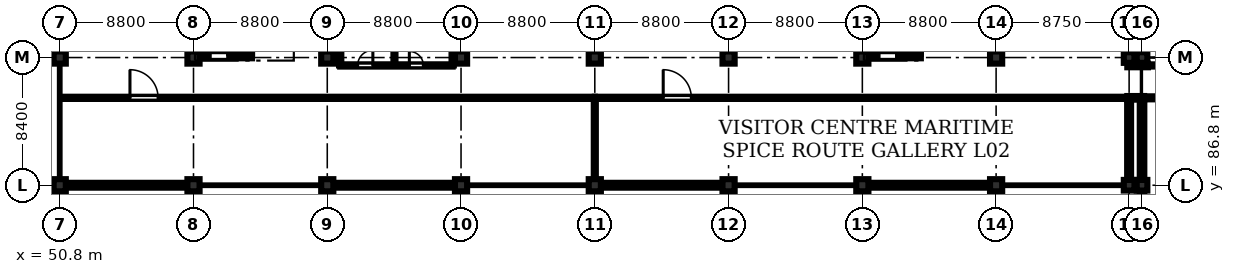
"""IFC4 building model, lengths in metres.
Left out: names, types, materials, properties, quantities, classifications, styles, units other than length and angle.
Written with IfcOpenShell. Run it as: python <this file> out.ifc"""

import sys

from ifc_helpers import new_model, si_unit, direction, frame, frame_2d, origin, origin_2d, place, context, subcontext, project, spatial, rectangle, extrude, element, fill, save


model = new_model("IFC4")
c1 = context("Model", 3, precision=1e-05, world=origin(), true_north=direction((0.0, 1.0)))
c2 = subcontext(c1, "Body", "Model", "MODEL_VIEW")
j1 = project(units=[si_unit("LENGTHUNIT", "METRE"), si_unit("PLANEANGLEUNIT", "RADIAN")], contexts=[c1])
p1 = place(None, origin())
s1 = spatial("IfcSite", under=j1, at=p1, CompositionType="ELEMENT")
p2 = place(p1, origin())
s2 = spatial("IfcBuilding", under=s1, at=p2, CompositionType="ELEMENT")
p3 = place(p2, frame((0.0, 0.0, 5.4)))
s3 = spatial("IfcBuildingStorey", under=s2, at=p3, CompositionType="ELEMENT", Elevation=5.4)
for number, where, z_axis, x_axis in (
    (1, (50.8, 86.8, 0.0), (0.0, 0.0, 1.0), (1.0, 0.0, 0.0)),
    (2, (50.8, 95.2, 0.0), (0.0, 0.0, 1.0), (1.0, 0.0, 0.0)),
    (3, (59.6, 86.8, 0.0), (0.0, 0.0, 1.0), (1.0, 0.0, 0.0)),
    (4, (59.6, 95.2, 0.0), (0.0, 0.0, 1.0), (1.0, 0.0, 0.0)),
    (5, (68.4, 86.8, 0.0), (0.0, 0.0, 1.0), (1.0, 0.0, 0.0)),
    (6, (68.4, 95.2, 0.0), (0.0, 0.0, 1.0), (1.0, 0.0, 0.0)),
    (7, (77.2, 86.8, 0.0), (0.0, 0.0, 1.0), (1.0, 0.0, 0.0)),
    (8, (77.2, 95.2, 0.0), (0.0, 0.0, 1.0), (1.0, 0.0, 0.0)),
    (9, (86.0, 86.8, 0.0), (0.0, 0.0, 1.0), (1.0, 0.0, 0.0)),
    (10, (86.0, 95.2, 0.0), (0.0, 0.0, 1.0), (1.0, 0.0, 0.0)),
    (11, (94.8, 86.8, 0.0), (0.0, 0.0, 1.0), (1.0, 0.0, 0.0)),
    (12, (94.8, 95.2, 0.0), (0.0, 0.0, 1.0), (1.0, 0.0, 0.0)),
    (13, (103.6, 86.8, 0.0), (0.0, 0.0, 1.0), (1.0, 0.0, 0.0)),
    (14, (103.6, 95.2, 0.0), (0.0, 0.0, 1.0), (1.0, 0.0, 0.0)),
    (15, (112.4, 86.8, 0.0), (0.0, 0.0, 1.0), (1.0, 0.0, 0.0)),
    (16, (112.4, 95.2, 0.0), (0.0, 0.0, 1.0), (1.0, 0.0, 0.0)),
):
    element("IfcColumn", number, at=place(p3, frame(where, z_axis=z_axis, x_axis=x_axis)), inside=s3, PredefinedType="COLUMN", context=c2, shape_type="SweptSolid", body=[
        extrude(rectangle(XDim=0.8, YDim=0.8, at=origin_2d()), origin(), (0.0, 0.0, 1.0), 4.58),
    ])
for number, where, z_axis, x_axis in (
    (17, (121.15, 86.8, 0.0), (0.0, 0.0, 1.0), (1.0, 0.0, 0.0)),
    (18, (121.15, 95.2, 0.0), (0.0, 0.0, 1.0), (1.0, 0.0, 0.0)),
    (19, (122.0, 86.8, 0.0), (0.0, 0.0, 1.0), (1.0, 0.0, 0.0)),
    (20, (122.0, 95.2, 0.0), (0.0, 0.0, 1.0), (1.0, 0.0, 0.0)),
):
    element("IfcColumn", number, at=place(p3, frame(where, z_axis=z_axis, x_axis=x_axis)), inside=s3, PredefinedType="COLUMN", context=c2, shape_type="SweptSolid", body=[
        extrude(rectangle(XDim=0.7, YDim=0.7, at=origin_2d()), origin(), (0.0, 0.0, 1.0), 4.58),
    ])
p4 = place(p3, frame((59.75, 95.3, 0.0), z_axis=(0.0, 0.0, 1.0), x_axis=(1.0, 0.0, 0.0)))
e21 = element("IfcWall", 21, at=p4, inside=s3, PredefinedType="SHEAR", context=c2, shape_type="SweptSolid", body=[
    extrude(rectangle(XDim=3.7, YDim=0.3, at=frame_2d((1.85, 0.0))), origin(), (0.0, 0.0, 1.0), 4.58),
])
p5 = place(p4, frame((0.95, 0.0, 0.0)))
e22 = element("IfcOpeningElement", 22, at=p5, cuts=e21, PredefinedType="OPENING", context=c2, shape_type="SweptSolid", body=[
    extrude(rectangle(XDim=1.15, YDim=2.15, at=frame_2d((0.575, 1.075))), frame((0.0, 0.16, 0.0), z_axis=(0.0, -1.0, 0.0), x_axis=(1.0, 0.0, 0.0)), (0.0, 0.0, 1.0), 0.32),
])
for number, where, z_axis, x_axis in (
    (23, (59.9, 95.45, 0.0), (0.0, 0.0, 1.0), (0.0, 1.0, 0.0)),
    (24, (63.3, 95.45, 0.0), (0.0, 0.0, 1.0), (0.0, 1.0, 0.0)),
):
    element("IfcWall", number, at=place(p3, frame(where, z_axis=z_axis, x_axis=x_axis)), inside=s3, PredefinedType="SHEAR", context=c2, shape_type="SweptSolid", body=[
        extrude(rectangle(XDim=7.9, YDim=0.3, at=frame_2d((3.95, 0.0))), origin(), (0.0, 0.0, 1.0), 4.58),
    ])
p6 = place(p3, frame((103.75, 95.3, 0.0), z_axis=(0.0, 0.0, 1.0), x_axis=(1.0, 0.0, 0.0)))
e25 = element("IfcWall", 25, at=p6, inside=s3, PredefinedType="SHEAR", context=c2, shape_type="SweptSolid", body=[
    extrude(rectangle(XDim=3.7, YDim=0.3, at=frame_2d((1.85, 0.0))), origin(), (0.0, 0.0, 1.0), 4.58),
])
p7 = place(p6, frame((0.95, 0.0, 0.0)))
e26 = element("IfcOpeningElement", 26, at=p7, cuts=e25, PredefinedType="OPENING", context=c2, shape_type="SweptSolid", body=[
    extrude(rectangle(XDim=1.15, YDim=2.15, at=frame_2d((0.575, 1.075))), frame((0.0, 0.16, 0.0), z_axis=(0.0, -1.0, 0.0), x_axis=(1.0, 0.0, 0.0)), (0.0, 0.0, 1.0), 0.32),
])
for number, where, z_axis, x_axis in (
    (27, (103.9, 95.45, 0.0), (0.0, 0.0, 1.0), (0.0, 1.0, 0.0)),
    (28, (107.3, 95.45, 0.0), (0.0, 0.0, 1.0), (0.0, 1.0, 0.0)),
):
    element("IfcWall", number, at=place(p3, frame(where, z_axis=z_axis, x_axis=x_axis)), inside=s3, PredefinedType="SHEAR", context=c2, shape_type="SweptSolid", body=[
        extrude(rectangle(XDim=7.9, YDim=0.3, at=frame_2d((3.95, 0.0))), origin(), (0.0, 0.0, 1.0), 4.58),
    ])
p8 = place(p3, frame((59.2, 86.8, 0.0), z_axis=(0.0, 0.0, 1.0), x_axis=(-1.0, 0.0, 0.0)))
e29 = element("IfcWall", 29, at=p8, inside=s3, PredefinedType="STANDARD", context=c2, shape_type="SweptSolid", body=[
    extrude(rectangle(XDim=8.0, YDim=0.32, at=frame_2d((4.0, 0.0))), origin(), (0.0, 0.0, 1.0), 3.93),
])
p9 = place(p8, frame((2.8, 0.0, 0.95)))
e30 = element("IfcOpeningElement", 30, at=p9, cuts=e29, PredefinedType="OPENING", context=c2, shape_type="SweptSolid", body=[
    extrude(rectangle(XDim=2.0, YDim=2.2, at=frame_2d((1.0, 1.1))), frame((0.0, 0.17, 0.0), z_axis=(0.0, -1.0, 0.0), x_axis=(1.0, 0.0, 0.0)), (0.0, 0.0, 1.0), 0.34),
])
p10 = place(p3, frame((76.8, 86.8, 0.0), z_axis=(0.0, 0.0, 1.0), x_axis=(-1.0, 0.0, 0.0)))
e31 = element("IfcWall", 31, at=p10, inside=s3, PredefinedType="STANDARD", context=c2, shape_type="SweptSolid", body=[
    extrude(rectangle(XDim=8.0, YDim=0.32, at=frame_2d((4.0, 0.0))), origin(), (0.0, 0.0, 1.0), 3.93),
])
p11 = place(p10, frame((2.8, 0.0, 0.95)))
e32 = element("IfcOpeningElement", 32, at=p11, cuts=e31, PredefinedType="OPENING", context=c2, shape_type="SweptSolid", body=[
    extrude(rectangle(XDim=2.0, YDim=2.2, at=frame_2d((1.0, 1.1))), frame((0.0, 0.17, 0.0), z_axis=(0.0, -1.0, 0.0), x_axis=(1.0, 0.0, 0.0)), (0.0, 0.0, 1.0), 0.34),
])
p12 = place(p3, frame((94.4, 86.8, 0.0), z_axis=(0.0, 0.0, 1.0), x_axis=(-1.0, 0.0, 0.0)))
e33 = element("IfcWall", 33, at=p12, inside=s3, PredefinedType="STANDARD", context=c2, shape_type="SweptSolid", body=[
    extrude(rectangle(XDim=8.0, YDim=0.32, at=frame_2d((4.0, 0.0))), origin(), (0.0, 0.0, 1.0), 3.93),
])
p13 = place(p12, frame((2.8, 0.0, 0.95)))
e34 = element("IfcOpeningElement", 34, at=p13, cuts=e33, PredefinedType="OPENING", context=c2, shape_type="SweptSolid", body=[
    extrude(rectangle(XDim=2.0, YDim=2.2, at=frame_2d((1.0, 1.1))), frame((0.0, 0.17, 0.0), z_axis=(0.0, -1.0, 0.0), x_axis=(1.0, 0.0, 0.0)), (0.0, 0.0, 1.0), 0.34),
])
p14 = place(p3, frame((112.0, 86.8, 0.0), z_axis=(0.0, 0.0, 1.0), x_axis=(-1.0, 0.0, 0.0)))
e35 = element("IfcWall", 35, at=p14, inside=s3, PredefinedType="STANDARD", context=c2, shape_type="SweptSolid", body=[
    extrude(rectangle(XDim=8.0, YDim=0.32, at=frame_2d((4.0, 0.0))), origin(), (0.0, 0.0, 1.0), 3.93),
])
p15 = place(p14, frame((2.8, 0.0, 0.95)))
e36 = element("IfcOpeningElement", 36, at=p15, cuts=e35, PredefinedType="OPENING", context=c2, shape_type="SweptSolid", body=[
    extrude(rectangle(XDim=2.0, YDim=2.2, at=frame_2d((1.0, 1.1))), frame((0.0, 0.17, 0.0), z_axis=(0.0, -1.0, 0.0), x_axis=(1.0, 0.0, 0.0)), (0.0, 0.0, 1.0), 0.34),
])
p16 = place(p3, frame((121.15, 92.42, 0.0), z_axis=(0.0, 0.0, 1.0), x_axis=(0.0, -1.0, 0.0)))
e37 = element("IfcWall", 37, at=p16, inside=s3, PredefinedType="STANDARD", context=c2, shape_type="SweptSolid", body=[
    extrude(rectangle(XDim=5.27, YDim=0.26, at=frame_2d((2.635, 0.0))), origin(), (0.0, 0.0, 1.0), 3.93),
])
p17 = place(p3, frame((121.15, 103.25, 0.0), z_axis=(0.0, 0.0, 1.0), x_axis=(0.0, -1.0, 0.0)))
e38 = element("IfcWall", 38, at=p17, inside=s3, PredefinedType="STANDARD", context=c2, shape_type="SweptSolid", body=[
    extrude(rectangle(XDim=7.7, YDim=0.26, at=frame_2d((3.85, 0.0))), origin(), (0.0, 0.0, 1.0), 3.93),
])
p18 = place(p3, frame((122.0, 78.75, 0.0), z_axis=(0.0, 0.0, 1.0), x_axis=(0.0, 1.0, 0.0)))
e39 = element("IfcWall", 39, at=p18, inside=s3, PredefinedType="STANDARD", context=c2, shape_type="SweptSolid", body=[
    extrude(rectangle(XDim=7.7, YDim=0.3, at=frame_2d((3.85, 0.0))), origin(), (0.0, 0.0, 1.0), 3.83),
])
p19 = place(p3, frame((122.0, 87.15, 0.0), z_axis=(0.0, 0.0, 1.0), x_axis=(0.0, 1.0, 0.0)))
e40 = element("IfcWall", 40, at=p19, inside=s3, PredefinedType="STANDARD", context=c2, shape_type="SweptSolid", body=[
    extrude(rectangle(XDim=5.27, YDim=0.3, at=frame_2d((2.635, 0.0))), origin(), (0.0, 0.0, 1.0), 3.83),
])
p20 = place(p3, frame((122.14, 92.55, 0.0), z_axis=(0.0, 0.0, 1.0), x_axis=(-1.0, 0.0, 0.0)))
e41 = element("IfcWall", 41, at=p20, inside=s3, PredefinedType="STANDARD", context=c2, shape_type="SweptSolid", body=[
    extrude(rectangle(XDim=1.11, YDim=0.24, at=frame_2d((0.555, 0.0))), origin(), (0.0, 0.0, 1.0), 4.58),
])
p21 = place(p3, frame((121.03, 94.68, 0.0), z_axis=(0.0, 0.0, 1.0), x_axis=(1.0, 0.0, 0.0)))
e42 = element("IfcWall", 42, at=p21, inside=s3, PredefinedType="STANDARD", context=c2, shape_type="SweptSolid", body=[
    extrude(rectangle(XDim=1.36, YDim=0.24, at=frame_2d((0.68, 0.0))), origin(), (0.0, 0.0, 1.0), 4.58),
])
p22 = place(p3, frame((122.0, 95.55, 0.0), z_axis=(0.0, 0.0, 1.0), x_axis=(0.0, 1.0, 0.0)))
e43 = element("IfcWall", 43, at=p22, inside=s3, PredefinedType="STANDARD", context=c2, shape_type="SweptSolid", body=[
    extrude(rectangle(XDim=7.7, YDim=0.3, at=frame_2d((3.85, 0.0))), origin(), (0.0, 0.0, 1.0), 3.83),
])
p23 = place(p3, frame((69.25, 94.68, 0.0), z_axis=(0.0, 0.0, 1.0), x_axis=(1.0, 0.0, 0.0)))
e44 = element("IfcWall", 44, at=p23, inside=s3, PredefinedType="PARTITIONING", context=c2, shape_type="SweptSolid", body=[
    extrude(rectangle(XDim=7.4, YDim=0.15, at=frame_2d((3.7, 0.0))), origin(), (0.0, 0.0, 1.0), 4.58),
])
p24 = place(p23, frame((1.15, 0.0, 0.0)))
e45 = element("IfcOpeningElement", 45, at=p24, cuts=e44, PredefinedType="OPENING", context=c2, shape_type="SweptSolid", body=[
    extrude(rectangle(XDim=1.0, YDim=2.12, at=frame_2d((0.5, 1.06))), frame((0.0, 0.085, 0.0), z_axis=(0.0, -1.0, 0.0), x_axis=(1.0, 0.0, 0.0)), (0.0, 0.0, 1.0), 0.17),
])
p25 = place(p23, frame((4.55, 0.0, 0.0)))
e46 = element("IfcOpeningElement", 46, at=p25, cuts=e44, PredefinedType="OPENING", context=c2, shape_type="SweptSolid", body=[
    extrude(rectangle(XDim=0.92, YDim=2.1, at=frame_2d((0.46, 1.05))), frame((0.0, 0.085, 0.0), z_axis=(0.0, -1.0, 0.0), x_axis=(1.0, 0.0, 0.0)), (0.0, 0.0, 1.0), 0.17),
])
p26 = place(p3, frame((69.25, 94.68, 0.0), z_axis=(0.0, 0.0, 1.0), x_axis=(0.0, 1.0, 0.0)))
e47 = element("IfcWall", 47, at=p26, inside=s3, PredefinedType="PARTITIONING", context=c2, shape_type="SweptSolid", body=[
    extrude(rectangle(XDim=8.57, YDim=0.15, at=frame_2d((4.285, 0.0))), origin(), (0.0, 0.0, 1.0), 4.58),
])
p27 = place(p3, frame((72.82, 94.68, 0.0), z_axis=(0.0, 0.0, 1.0), x_axis=(0.0, 1.0, 0.0)))
e48 = element("IfcWall", 48, at=p27, inside=s3, PredefinedType="PARTITIONING", context=c2, shape_type="SweptSolid", body=[
    extrude(rectangle(XDim=8.57, YDim=0.135, at=frame_2d((4.285, 0.0))), origin(), (0.0, 0.0, 1.0), 4.24),
])
p28 = place(p3, frame((76.65, 94.68, 0.0), z_axis=(0.0, 0.0, 1.0), x_axis=(0.0, 1.0, 0.0)))
e49 = element("IfcWall", 49, at=p28, inside=s3, PredefinedType="PARTITIONING", context=c2, shape_type="SweptSolid", body=[
    extrude(rectangle(XDim=8.57, YDim=0.15, at=frame_2d((4.285, 0.0))), origin(), (0.0, 0.0, 1.0), 4.58),
])
p29 = place(p3, frame((50.92, 92.55, 0.0), z_axis=(0.0, 0.0, 1.0), x_axis=(1.0, 0.0, 0.0)))
e50 = element("IfcWall", 50, at=p29, inside=s3, PredefinedType="PARTITIONING", context=c2, shape_type="SweptSolid", body=[
    extrude(rectangle(XDim=35.08, YDim=0.145, at=frame_2d((17.54, 0.0))), origin(), (0.0, 0.0, 1.0), 4.58),
])
p30 = place(p29, frame((4.5, 0.0, 0.0)))
e51 = element("IfcOpeningElement", 51, at=p30, cuts=e50, PredefinedType="OPENING", context=c2, shape_type="SweptSolid", body=[
    extrude(rectangle(XDim=1.85, YDim=2.25, at=frame_2d((0.925, 1.125))), frame((0.0, 0.083, 0.0), z_axis=(0.0, -1.0, 0.0), x_axis=(1.0, 0.0, 0.0)), (0.0, 0.0, 1.0), 0.165),
])
p31 = place(p3, frame((86.0, 92.55, 0.0), z_axis=(0.0, 0.0, 1.0), x_axis=(1.0, 0.0, 0.0)))
e52 = element("IfcWall", 52, at=p31, inside=s3, PredefinedType="PARTITIONING", context=c2, shape_type="SweptSolid", body=[
    extrude(rectangle(XDim=35.02, YDim=0.145, at=frame_2d((17.51, 0.0))), origin(), (0.0, 0.0, 1.0), 4.58),
])
p32 = place(p31, frame((4.5, 0.0, 0.0)))
e53 = element("IfcOpeningElement", 53, at=p32, cuts=e52, PredefinedType="OPENING", context=c2, shape_type="SweptSolid", body=[
    extrude(rectangle(XDim=1.85, YDim=2.25, at=frame_2d((0.925, 1.125))), frame((0.0, 0.083, 0.0), z_axis=(0.0, -1.0, 0.0), x_axis=(1.0, 0.0, 0.0)), (0.0, 0.0, 1.0), 0.165),
])
p33 = place(p3, frame((86.0, 86.95, 0.0), z_axis=(0.0, 0.0, 1.0), x_axis=(0.0, 1.0, 0.0)))
e54 = element("IfcWall", 54, at=p33, inside=s3, PredefinedType="PARTITIONING", context=c2, shape_type="SweptSolid", body=[
    extrude(rectangle(XDim=5.6, YDim=0.135, at=frame_2d((2.8, 0.0))), origin(), (0.0, 0.0, 1.0), 3.93),
])
p34 = place(p3, frame((122.4, 94.68, 0.0), z_axis=(0.0, 0.0, 1.0), x_axis=(1.0, 0.0, 0.0)))
e55 = element("IfcWall", 55, at=p34, inside=s3, PredefinedType="PARTITIONING", context=c2, shape_type="SweptSolid", body=[
    extrude(rectangle(XDim=13.8, YDim=0.145, at=frame_2d((6.9, 0.0))), origin(), (0.0, 0.0, 1.0), 4.58),
])
p35 = place(p34, frame((3.2, 0.0, 0.0)))
e56 = element("IfcOpeningElement", 56, at=p35, cuts=e55, PredefinedType="OPENING", context=c2, shape_type="SweptSolid", body=[
    extrude(rectangle(XDim=1.02, YDim=2.15, at=frame_2d((0.51, 1.075))), frame((0.0, 0.083, 0.0), z_axis=(0.0, -1.0, 0.0), x_axis=(1.0, 0.0, 0.0)), (0.0, 0.0, 1.0), 0.165),
])
p36 = place(p3, frame((122.15, 92.55, 0.0), z_axis=(0.0, 0.0, 1.0), x_axis=(1.0, 0.0, 0.0)))
e57 = element("IfcWall", 57, at=p36, inside=s3, PredefinedType="SOLIDWALL", context=c2, shape_type="SweptSolid", body=[
    extrude(rectangle(XDim=12.45, YDim=0.2, at=frame_2d((6.225, 0.0))), origin(), (0.0, 0.0, 1.0), 4.58),
])
p37 = place(p36, frame((3.75, 0.0, 0.0)))
e58 = element("IfcOpeningElement", 58, at=p37, cuts=e57, PredefinedType="OPENING", context=c2, shape_type="SweptSolid", body=[
    extrude(rectangle(XDim=1.5, YDim=2.2, at=frame_2d((0.75, 1.1))), frame((0.0, 0.11, 0.0), z_axis=(0.0, -1.0, 0.0), x_axis=(1.0, 0.0, 0.0)), (0.0, 0.0, 1.0), 0.22),
])
p38 = place(p9, origin())
e59 = element("IfcWindow", 59, at=p38, inside=s3, PartitioningType="DOUBLE_PANEL_VERTICAL", PredefinedType="WINDOW", context=c2, shape_type="SweptSolid", body=[
    extrude(rectangle(XDim=2.0, YDim=2.2, at=frame_2d((1.0, 1.1))), frame((0.0, 0.03, 0.0), z_axis=(0.0, -1.0, 0.0), x_axis=(1.0, 0.0, 0.0)), (0.0, 0.0, 1.0), 0.06),
])
fill(e30, e59)
p39 = place(p11, origin())
e60 = element("IfcWindow", 60, at=p39, inside=s3, PartitioningType="DOUBLE_PANEL_VERTICAL", PredefinedType="WINDOW", context=c2, shape_type="SweptSolid", body=[
    extrude(rectangle(XDim=2.0, YDim=2.2, at=frame_2d((1.0, 1.1))), frame((0.0, 0.03, 0.0), z_axis=(0.0, -1.0, 0.0), x_axis=(1.0, 0.0, 0.0)), (0.0, 0.0, 1.0), 0.06),
])
fill(e32, e60)
p40 = place(p13, origin())
e61 = element("IfcWindow", 61, at=p40, inside=s3, PartitioningType="DOUBLE_PANEL_VERTICAL", PredefinedType="WINDOW", context=c2, shape_type="SweptSolid", body=[
    extrude(rectangle(XDim=2.0, YDim=2.2, at=frame_2d((1.0, 1.1))), frame((0.0, 0.03, 0.0), z_axis=(0.0, -1.0, 0.0), x_axis=(1.0, 0.0, 0.0)), (0.0, 0.0, 1.0), 0.06),
])
fill(e34, e61)
p41 = place(p15, origin())
e62 = element("IfcWindow", 62, at=p41, inside=s3, PartitioningType="DOUBLE_PANEL_VERTICAL", PredefinedType="WINDOW", context=c2, shape_type="SweptSolid", body=[
    extrude(rectangle(XDim=2.0, YDim=2.2, at=frame_2d((1.0, 1.1))), frame((0.0, 0.03, 0.0), z_axis=(0.0, -1.0, 0.0), x_axis=(1.0, 0.0, 0.0)), (0.0, 0.0, 1.0), 0.06),
])
fill(e36, e62)
p42 = place(p24, origin())
e63 = element("IfcDoor", 63, at=p42, inside=s3, OperationType="SINGLE_SWING_RIGHT", PredefinedType="DOOR", context=c2, shape_type="SweptSolid", body=[
    extrude(rectangle(XDim=1.0, YDim=2.12, at=frame_2d((0.5, 1.06))), frame((0.0, 0.025, 0.0), z_axis=(0.0, -1.0, 0.0), x_axis=(1.0, 0.0, 0.0)), (0.0, 0.0, 1.0), 0.05),
])
fill(e45, e63)
p43 = place(p25, origin())
e64 = element("IfcDoor", 64, at=p43, inside=s3, OperationType="SINGLE_SWING_LEFT", PredefinedType="DOOR", context=c2, shape_type="SweptSolid", body=[
    extrude(rectangle(XDim=0.92, YDim=2.1, at=frame_2d((0.46, 1.05))), frame((0.0, 0.025, 0.0), z_axis=(0.0, -1.0, 0.0), x_axis=(1.0, 0.0, 0.0)), (0.0, 0.0, 1.0), 0.05),
])
fill(e46, e64)
p44 = place(p30, origin())
e65 = element("IfcDoor", 65, at=p44, inside=s3, OperationType="SINGLE_SWING_LEFT", PredefinedType="DOOR", context=c2, shape_type="SweptSolid", body=[
    extrude(rectangle(XDim=1.85, YDim=2.25, at=frame_2d((0.925, 1.125))), frame((0.0, 0.025, 0.0), z_axis=(0.0, -1.0, 0.0), x_axis=(1.0, 0.0, 0.0)), (0.0, 0.0, 1.0), 0.05),
])
fill(e51, e65)
p45 = place(p32, origin())
e66 = element("IfcDoor", 66, at=p45, inside=s3, OperationType="SINGLE_SWING_LEFT", PredefinedType="DOOR", context=c2, shape_type="SweptSolid", body=[
    extrude(rectangle(XDim=1.85, YDim=2.25, at=frame_2d((0.925, 1.125))), frame((0.0, 0.025, 0.0), z_axis=(0.0, -1.0, 0.0), x_axis=(1.0, 0.0, 0.0)), (0.0, 0.0, 1.0), 0.05),
])
fill(e53, e66)
p46 = place(p5, origin())
e67 = element("IfcDoor", 67, at=p46, inside=s3, OperationType="SINGLE_SWING_RIGHT", PredefinedType="DOOR", context=c2, shape_type="SweptSolid", body=[
    extrude(rectangle(XDim=1.15, YDim=2.15, at=frame_2d((0.575, 1.075))), frame((0.0, 0.025, 0.0), z_axis=(0.0, -1.0, 0.0), x_axis=(1.0, 0.0, 0.0)), (0.0, 0.0, 1.0), 0.05),
])
fill(e22, e67)
p47 = place(p7, origin())
e68 = element("IfcDoor", 68, at=p47, inside=s3, OperationType="SINGLE_SWING_RIGHT", PredefinedType="DOOR", context=c2, shape_type="SweptSolid", body=[
    extrude(rectangle(XDim=1.15, YDim=2.15, at=frame_2d((0.575, 1.075))), frame((0.0, 0.025, 0.0), z_axis=(0.0, -1.0, 0.0), x_axis=(1.0, 0.0, 0.0)), (0.0, 0.0, 1.0), 0.05),
])
fill(e26, e68)
save(model, sys.argv[1])
